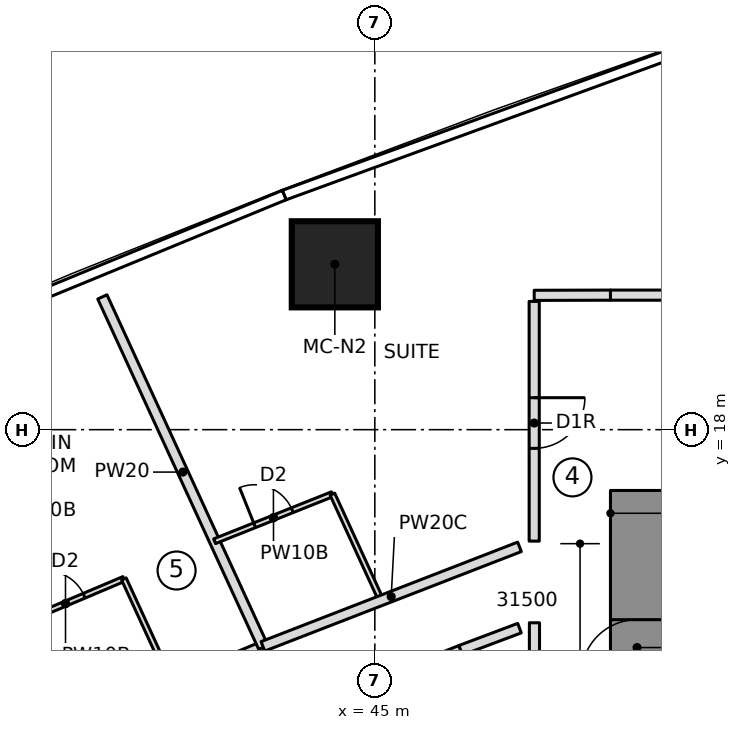
"""IFC4 building model, lengths in metres.
Left out: names, types, materials, properties, quantities, classifications, styles, units other than length and angle.
Written with IfcOpenShell. Run it as: python <this file> out.ifc"""

import sys

from ifc_helpers import new_model, si_unit, direction, frame, frame_2d, origin, origin_2d, place, context, subcontext, project, spatial, rectangle, extrude, element, fill, save


model = new_model("IFC4")
c1 = context("Model", 3, precision=1e-05, world=origin(), true_north=direction((0.0, 1.0)))
c2 = subcontext(c1, "Body", "Model", "MODEL_VIEW")
j1 = project(units=[si_unit("LENGTHUNIT", "METRE"), si_unit("PLANEANGLEUNIT", "RADIAN")], contexts=[c1])
p1 = place(None, origin())
s1 = spatial("IfcSite", under=j1, at=p1, CompositionType="ELEMENT")
p2 = place(p1, origin())
s2 = spatial("IfcBuilding", under=s1, at=p2, CompositionType="ELEMENT")
p3 = place(p2, frame((0.0, 0.0, 84.9)))
s3 = spatial("IfcBuildingStorey", under=s2, at=p3, CompositionType="ELEMENT", Elevation=84.9)
p4 = place(p3, frame((50.175, 6.65, 0.0), z_axis=(0.0, 0.0, 1.0), x_axis=(0.0, 1.0, 0.0)))
e1 = element("IfcWall", 1, at=p4, inside=s3, PredefinedType="SHEAR", context=c2, shape_type="SweptSolid", body=[
    extrude(rectangle(XDim=10.15, YDim=1.05, at=frame_2d((5.075, 0.0))), origin(), (0.0, 0.0, 1.0), 3.55),
])
p5 = place(p4, frame((6.5, 0.0, 0.0)))
e2 = element("IfcOpeningElement", 2, at=p5, cuts=e1, PredefinedType="OPENING", context=c2, shape_type="SweptSolid", body=[
    extrude(rectangle(XDim=1.1, YDim=2.1, at=frame_2d((0.55, 1.05))), frame((0.0, 0.535, 0.0), z_axis=(0.0, -1.0, 0.0), x_axis=(1.0, 0.0, 0.0)), (0.0, 0.0, 1.0), 1.07),
])
p6 = place(p3, frame((44.211, 21.264, 0.0), z_axis=(0.0, 0.0, 1.0), x_axis=(1.0, 0.0, 0.0)))
e3 = element("IfcColumn", 3, at=p6, inside=s3, PredefinedType="COLUMN", context=c2, shape_type="SweptSolid", body=[
    extrude(rectangle(XDim=1.7, YDim=1.7, at=origin_2d()), origin(), (0.0, 0.0, 1.0), 3.55),
])
p7 = place(p3, frame((38.704, 11.989, 0.0), z_axis=(0.0, 0.0, 1.0), x_axis=(-0.417416334044, 0.908715359215, 0.0)))
e4 = element("IfcWall", 4, at=p7, inside=s3, PredefinedType="PARTITIONING", context=c2, shape_type="SweptSolid", body=[
    extrude(rectangle(XDim=7.604, YDim=0.2, at=frame_2d((3.802, 0.0))), origin(), (0.0, 0.0, 1.0), 3.25),
])
p8 = place(p3, frame((42.791, 13.724, 0.0), z_axis=(0.0, 0.0, 1.0), x_axis=(-0.922230433067, -0.386640696675, 0.0)))
e5 = element("IfcWall", 5, at=p8, inside=s3, PredefinedType="PARTITIONING", context=c2, shape_type="SweptSolid", body=[
    extrude(rectangle(XDim=4.44, YDim=0.2, at=frame_2d((2.22, 0.0))), origin(), (0.0, 0.0, 1.0), 3.25),
])
p9 = place(p8, frame((0.45, 0.0, 0.0)))
e6 = element("IfcOpeningElement", 6, at=p9, cuts=e5, PredefinedType="OPENING", context=c2, shape_type="SweptSolid", body=[
    extrude(rectangle(XDim=1.0, YDim=2.1, at=frame_2d((0.5, 1.05))), frame((0.0, 0.11, 0.0), z_axis=(0.0, -1.0, 0.0), x_axis=(1.0, 0.0, 0.0)), (0.0, 0.0, 1.0), 0.22),
])
p10 = place(p3, frame((37.744, 14.08, 0.0), z_axis=(0.0, 0.0, 1.0), x_axis=(0.921042675983, 0.38946166566, 0.0)))
e7 = element("IfcWall", 7, at=p10, inside=s3, PredefinedType="PARTITIONING", context=c2, shape_type="SweptSolid", body=[
    extrude(rectangle(XDim=2.501, YDim=0.1, at=frame_2d((1.25, 0.0))), origin(), (0.0, 0.0, 1.0), 3.25),
])
p11 = place(p10, frame((0.85, 0.0, 0.0)))
e8 = element("IfcOpeningElement", 8, at=p11, cuts=e7, PredefinedType="OPENING", context=c2, shape_type="SweptSolid", body=[
    extrude(rectangle(XDim=0.8, YDim=2.1, at=frame_2d((0.4, 1.05))), frame((0.0, 0.06, 0.0), z_axis=(0.0, -1.0, 0.0), x_axis=(1.0, 0.0, 0.0)), (0.0, 0.0, 1.0), 0.12),
])
p12 = place(p3, frame((40.048, 15.054, 0.0), z_axis=(0.0, 0.0, 1.0), x_axis=(0.417433204355, -0.908707609686, 0.0)))
e9 = element("IfcWall", 9, at=p12, inside=s3, PredefinedType="PARTITIONING", context=c2, shape_type="SweptSolid", body=[
    extrude(rectangle(XDim=2.278, YDim=0.1, at=frame_2d((1.139, 0.0))), origin(), (0.0, 0.0, 1.0), 3.25),
])
p13 = place(p3, frame((42.799, 13.705, 0.0), z_axis=(0.0, 0.0, 1.0), x_axis=(-0.417427858403, 0.908710065438, 0.0)))
e10 = element("IfcWall", 10, at=p13, inside=s3, PredefinedType="PARTITIONING", context=c2, shape_type="SweptSolid", body=[
    extrude(rectangle(XDim=7.61, YDim=0.2, at=frame_2d((3.805, 0.0))), origin(), (0.0, 0.0, 1.0), 3.25),
])
p14 = place(p3, frame((41.838, 15.798, 0.0), z_axis=(0.0, 0.0, 1.0), x_axis=(0.928638024739, 0.370987087388, 0.0)))
e11 = element("IfcWall", 11, at=p14, inside=s3, PredefinedType="PARTITIONING", context=c2, shape_type="SweptSolid", body=[
    extrude(rectangle(XDim=2.503, YDim=0.1, at=frame_2d((1.252, 0.0))), origin(), (0.0, 0.0, 1.0), 3.25),
])
p15 = place(p14, frame((0.85, 0.0, 0.0)))
e12 = element("IfcOpeningElement", 12, at=p15, cuts=e11, PredefinedType="OPENING", context=c2, shape_type="SweptSolid", body=[
    extrude(rectangle(XDim=0.8, YDim=2.1, at=frame_2d((0.4, 1.05))), frame((0.0, 0.06, 0.0), z_axis=(0.0, -1.0, 0.0), x_axis=(1.0, 0.0, 0.0)), (0.0, 0.0, 1.0), 0.12),
])
p16 = place(p3, frame((44.163, 16.727, 0.0), z_axis=(0.0, 0.0, 1.0), x_axis=(0.417373525971, -0.908735021785, 0.0)))
e13 = element("IfcWall", 13, at=p16, inside=s3, PredefinedType="PARTITIONING", context=c2, shape_type="SweptSolid", body=[
    extrude(rectangle(XDim=2.28, YDim=0.1, at=frame_2d((1.14, 0.0))), origin(), (0.0, 0.0, 1.0), 3.25),
])
p17 = place(p3, frame((42.728, 12.062, 0.0), z_axis=(0.0, 0.0, 1.0), x_axis=(0.928638161177, 0.370986745864, 0.0)))
e14 = element("IfcWall", 14, at=p17, inside=s3, PredefinedType="PARTITIONING", context=c2, shape_type="SweptSolid", body=[
    extrude(rectangle(XDim=4.273, YDim=0.2, at=frame_2d((2.136, 0.0))), origin(), (0.0, 0.0, 1.0), 3.25),
])
p18 = place(p3, frame((54.625, 20.655, 0.0), z_axis=(0.0, 0.0, 1.0), x_axis=(-1.0, 0.0, 0.0)))
e15 = element("IfcWall", 15, at=p18, inside=s3, PredefinedType="PARTITIONING", context=c2, shape_type="SweptSolid", body=[
    extrude(rectangle(XDim=4.976, YDim=0.2, at=frame_2d((2.488, 0.0))), origin(), (0.0, 0.0, 1.0), 3.25),
])
p19 = place(p18, frame((1.988, 0.0, 0.0)))
e16 = element("IfcOpeningElement", 16, at=p19, cuts=e15, PredefinedType="OPENING", context=c2, shape_type="SweptSolid", body=[
    extrude(rectangle(XDim=1.5, YDim=2.1, at=frame_2d((0.75, 1.05))), frame((0.0, 0.11, 0.0), z_axis=(0.0, -1.0, 0.0), x_axis=(1.0, 0.0, 0.0)), (0.0, 0.0, 1.0), 0.22),
])
p20 = place(p3, frame((47.855, 15.687, 0.0), z_axis=(0.0, 0.0, 1.0), x_axis=(-0.932373677254, -0.361495955668, 0.0)))
e17 = element("IfcWall", 17, at=p20, inside=s3, PredefinedType="PARTITIONING", context=c2, shape_type="SweptSolid", body=[
    extrude(rectangle(XDim=5.431, YDim=0.2, at=frame_2d((2.716, 0.0))), origin(), (0.0, 0.0, 1.0), 3.25),
])
p21 = place(p3, frame((46.696, 13.647, 0.0), z_axis=(0.0, 0.0, 1.0), x_axis=(0.935907269358, 0.352246480696, 0.0)))
e18 = element("IfcWall", 18, at=p21, inside=s3, PredefinedType="PARTITIONING", context=c2, shape_type="SweptSolid", body=[
    extrude(rectangle(XDim=1.239, YDim=0.2, at=frame_2d((0.619, 0.0))), origin(), (0.0, 0.0, 1.0), 3.25),
])
p22 = place(p3, frame((48.15, 14.189, 0.0), z_axis=(0.0, 0.0, 1.0), x_axis=(0.0, -1.0, 0.0)))
e19 = element("IfcWall", 19, at=p22, inside=s3, PredefinedType="PARTITIONING", context=c2, shape_type="SweptSolid", body=[
    extrude(rectangle(XDim=28.377, YDim=0.2, at=frame_2d((14.189, 0.0))), origin(), (0.0, 0.0, 1.0), 3.25),
])
p23 = place(p3, frame((49.65, 20.655, 0.0), z_axis=(0.0, 0.0, 1.0), x_axis=(-0.999996196879, -0.002757938895, 0.0)))
e20 = element("IfcWall", 20, at=p23, inside=s3, PredefinedType="PARTITIONING", context=c2, shape_type="SweptSolid", body=[
    extrude(rectangle(XDim=1.505, YDim=0.2, at=frame_2d((0.752, 0.0))), origin(), (0.0, 0.0, 1.0), 3.25),
])
p24 = place(p3, frame((48.145, 20.531, 0.0), z_axis=(0.0, 0.0, 1.0), x_axis=(5.1610239e-05, -0.999999998668, 0.0)))
e21 = element("IfcWall", 21, at=p24, inside=s3, PredefinedType="PARTITIONING", context=c2, shape_type="SweptSolid", body=[
    extrude(rectangle(XDim=4.73, YDim=0.2, at=frame_2d((2.365, 0.0))), origin(), (0.0, 0.0, 1.0), 3.25),
])
p25 = place(p24, frame((1.9, 0.0, 0.0)))
e22 = element("IfcOpeningElement", 22, at=p25, cuts=e21, PredefinedType="OPENING", context=c2, shape_type="SweptSolid", body=[
    extrude(rectangle(XDim=1.0, YDim=2.1, at=frame_2d((0.5, 1.05))), frame((0.0, 0.11, 0.0), z_axis=(0.0, -1.0, 0.0), x_axis=(1.0, 0.0, 0.0)), (0.0, 0.0, 1.0), 0.22),
])
p26 = place(p11, origin())
e23 = element("IfcDoor", 23, at=p26, inside=s3, OperationType="SINGLE_SWING_LEFT", PredefinedType="DOOR", context=c2, shape_type="SweptSolid", body=[
    extrude(rectangle(XDim=0.8, YDim=2.1, at=frame_2d((0.4, 1.05))), frame((0.0, 0.025, 0.0), z_axis=(0.0, -1.0, 0.0), x_axis=(1.0, 0.0, 0.0)), (0.0, 0.0, 1.0), 0.05),
])
fill(e8, e23)
p27 = place(p15, origin())
e24 = element("IfcDoor", 24, at=p27, inside=s3, OperationType="SINGLE_SWING_LEFT", PredefinedType="DOOR", context=c2, shape_type="SweptSolid", body=[
    extrude(rectangle(XDim=0.8, YDim=2.1, at=frame_2d((0.4, 1.05))), frame((0.0, 0.025, 0.0), z_axis=(0.0, -1.0, 0.0), x_axis=(1.0, 0.0, 0.0)), (0.0, 0.0, 1.0), 0.05),
])
fill(e12, e24)
p28 = place(p25, origin())
e25 = element("IfcDoor", 25, at=p28, inside=s3, OperationType="SINGLE_SWING_RIGHT", PredefinedType="DOOR", context=c2, shape_type="SweptSolid", body=[
    extrude(rectangle(XDim=1.0, YDim=2.1, at=frame_2d((0.5, 1.05))), frame((0.0, 0.025, 0.0), z_axis=(0.0, -1.0, 0.0), x_axis=(1.0, 0.0, 0.0)), (0.0, 0.0, 1.0), 0.05),
])
fill(e22, e25)
p29 = place(p5, origin())
e26 = element("IfcDoor", 26, at=p29, inside=s3, OperationType="SINGLE_SWING_RIGHT", PredefinedType="DOOR", context=c2, shape_type="SweptSolid", body=[
    extrude(rectangle(XDim=1.1, YDim=2.1, at=frame_2d((0.55, 1.05))), frame((0.0, 0.025, 0.0), z_axis=(0.0, -1.0, 0.0), x_axis=(1.0, 0.0, 0.0)), (0.0, 0.0, 1.0), 0.05),
])
fill(e2, e26)
save(model, sys.argv[1])
